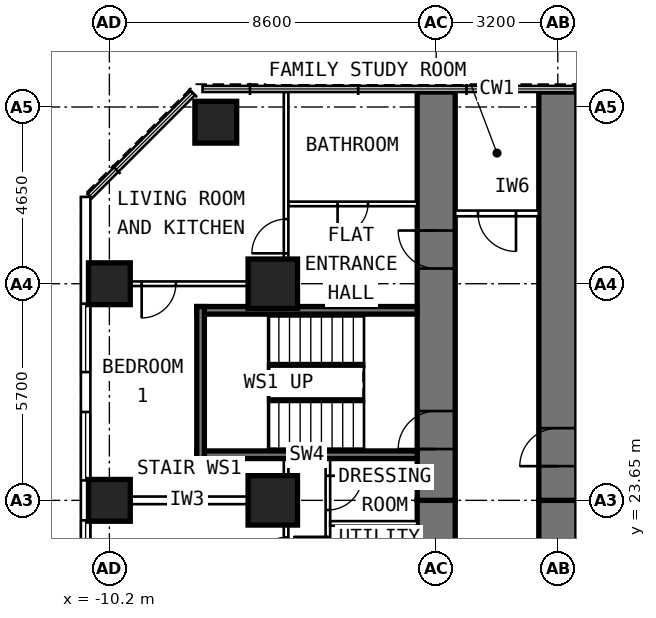
"""IFC4 building model, lengths in metres.
Left out: names, types, materials, properties, quantities, classifications, styles, units other than length and angle.
Written with IfcOpenShell. Run it as: python <this file> out.ifc"""

import sys

from ifc_helpers import new_model, si_unit, direction, frame, frame_2d, origin, origin_2d, place, context, subcontext, project, spatial, rectangle, extrude, element, fill, save


model = new_model("IFC4")
c1 = context("Model", 3, precision=1e-05, world=origin(), true_north=direction((0.0, 1.0)))
c2 = subcontext(c1, "Body", "Model", "MODEL_VIEW")
j1 = project(units=[si_unit("LENGTHUNIT", "METRE"), si_unit("PLANEANGLEUNIT", "RADIAN")], contexts=[c1])
p1 = place(None, origin())
s1 = spatial("IfcSite", under=j1, at=p1, CompositionType="ELEMENT")
p2 = place(p1, origin())
s2 = spatial("IfcBuilding", under=s1, at=p2, CompositionType="ELEMENT")
p3 = place(p2, frame((0.0, 0.0, 39.4)))
s3 = spatial("IfcBuildingStorey", under=s2, at=p3, CompositionType="ELEMENT", Elevation=39.4)
for number, where, z_axis, x_axis in (
    (1, (-10.2, 23.65, 0.0), (0.0, 0.0, 1.0), (0.0, 1.0, 0.0)),
    (2, (-10.2, 29.35, 0.0), (0.0, 0.0, 1.0), (0.0, 1.0, 0.0)),
    (3, (-7.4, 33.6, 0.0), (0.0, 0.0, 1.0), (0.0, 1.0, 0.0)),
):
    element("IfcColumn", number, at=place(p3, frame(where, z_axis=z_axis, x_axis=x_axis)), inside=s3, PredefinedType="COLUMN", context=c2, shape_type="SweptSolid", body=[
        extrude(rectangle(XDim=1.1, YDim=1.1, at=origin_2d()), origin(), (0.0, 0.0, 1.0), 3.6),
    ])
for number, where, z_axis, x_axis in (
    (4, (-5.9, 23.65, 0.0), (0.0, 0.0, 1.0), (0.0, 1.0, 0.0)),
    (5, (-5.9, 29.35, 0.0), (0.0, 0.0, 1.0), (0.0, 1.0, 0.0)),
):
    element("IfcColumn", number, at=place(p3, frame(where, z_axis=z_axis, x_axis=x_axis)), inside=s3, PredefinedType="COLUMN", context=c2, shape_type="SweptSolid", body=[
        extrude(rectangle(XDim=1.3, YDim=1.3, at=origin_2d()), origin(), (0.0, 0.0, 1.0), 3.6),
    ])
p4 = place(p3, frame((-1.6, 17.95, 0.0), z_axis=(0.0, 0.0, 1.0), x_axis=(0.0, 1.0, 0.0)))
e6 = element("IfcWall", 6, at=p4, inside=s3, PredefinedType="SHEAR", context=c2, shape_type="SweptSolid", body=[
    extrude(rectangle(XDim=5.7, YDim=1.0, at=frame_2d((2.85, 0.0))), origin(), (0.0, 0.0, 1.0), 3.6),
])
p5 = place(p3, frame((-1.6, 23.65, 0.0), z_axis=(0.0, 0.0, 1.0), x_axis=(0.0, 1.0, 0.0)))
e7 = element("IfcWall", 7, at=p5, inside=s3, PredefinedType="SHEAR", context=c2, shape_type="SweptSolid", body=[
    extrude(rectangle(XDim=10.745, YDim=1.0, at=frame_2d((5.373, 0.0))), origin(), (0.0, 0.0, 1.0), 3.6),
])
p6 = place(p5, frame((6.1, 0.0, 0.0)))
e8 = element("IfcOpeningElement", 8, at=p6, cuts=e7, PredefinedType="OPENING", context=c2, shape_type="SweptSolid", body=[
    extrude(rectangle(XDim=1.0, YDim=2.1, at=frame_2d((0.5, 1.05))), frame((0.0, 0.512, 0.0), z_axis=(0.0, -1.0, 0.0), x_axis=(1.0, 0.0, 0.0)), (0.0, 0.0, 1.0), 1.024),
])
p7 = place(p5, frame((1.35, 0.0, 0.0)))
e9 = element("IfcOpeningElement", 9, at=p7, cuts=e7, PredefinedType="OPENING", context=c2, shape_type="SweptSolid", body=[
    extrude(rectangle(XDim=1.0, YDim=2.1, at=frame_2d((0.5, 1.05))), frame((0.0, 0.512, 0.0), z_axis=(0.0, -1.0, 0.0), x_axis=(1.0, 0.0, 0.0)), (0.0, 0.0, 1.0), 1.024),
])
p8 = place(p3, frame((1.6, 17.95, 0.0), z_axis=(0.0, 0.0, 1.0), x_axis=(0.0, 1.0, 0.0)))
e10 = element("IfcWall", 10, at=p8, inside=s3, PredefinedType="SHEAR", context=c2, shape_type="SweptSolid", body=[
    extrude(rectangle(XDim=5.7, YDim=1.0, at=frame_2d((2.85, 0.0))), origin(), (0.0, 0.0, 1.0), 3.6),
])
p9 = place(p3, frame((1.6, 23.65, 0.0), z_axis=(0.0, 0.0, 1.0), x_axis=(0.0, 1.0, 0.0)))
e11 = element("IfcWall", 11, at=p9, inside=s3, PredefinedType="SHEAR", context=c2, shape_type="SweptSolid", body=[
    extrude(rectangle(XDim=10.745, YDim=1.0, at=frame_2d((5.373, 0.0))), origin(), (0.0, 0.0, 1.0), 3.6),
])
p10 = place(p9, frame((0.9, 0.0, 0.0)))
e12 = element("IfcOpeningElement", 12, at=p10, cuts=e11, PredefinedType="OPENING", context=c2, shape_type="SweptSolid", body=[
    extrude(rectangle(XDim=1.0, YDim=2.1, at=frame_2d((0.5, 1.05))), frame((0.0, 0.512, 0.0), z_axis=(0.0, -1.0, 0.0), x_axis=(1.0, 0.0, 0.0)), (0.0, 0.0, 1.0), 1.024),
])
p11 = place(p3, frame((-10.825, 6.409, 0.0), z_axis=(0.0, 0.0, 1.0), x_axis=(0.0, 1.0, 0.0)))
e13 = element("IfcWall", 13, at=p11, inside=s3, PredefinedType="SOLIDWALL", context=c2, shape_type="SweptSolid", body=[
    extrude(rectangle(XDim=25.226, YDim=0.25, at=frame_2d((12.613, 0.0))), origin(), (0.0, 0.0, 1.0), 3.35),
])
p12 = place(p11, frame((0.666, 0.0, 0.8)))
e14 = element("IfcOpeningElement", 14, at=p12, cuts=e13, PredefinedType="OPENING", context=c2, shape_type="SweptSolid", body=[
    extrude(rectangle(XDim=1.8, YDim=1.8, at=frame_2d((0.9, 0.9))), frame((0.0, 0.137, 0.0), z_axis=(0.0, -1.0, 0.0), x_axis=(1.0, 0.0, 0.0)), (0.0, 0.0, 1.0), 0.274),
])
p13 = place(p11, frame((3.516, 0.0, 0.8)))
e15 = element("IfcOpeningElement", 15, at=p13, cuts=e13, PredefinedType="OPENING", context=c2, shape_type="SweptSolid", body=[
    extrude(rectangle(XDim=1.8, YDim=1.8, at=frame_2d((0.9, 0.9))), frame((0.0, 0.137, 0.0), z_axis=(0.0, -1.0, 0.0), x_axis=(1.0, 0.0, 0.0)), (0.0, 0.0, 1.0), 0.274),
])
p14 = place(p11, frame((6.366, 0.0, 0.8)))
e16 = element("IfcOpeningElement", 16, at=p14, cuts=e13, PredefinedType="OPENING", context=c2, shape_type="SweptSolid", body=[
    extrude(rectangle(XDim=1.8, YDim=1.8, at=frame_2d((0.9, 0.9))), frame((0.0, 0.137, 0.0), z_axis=(0.0, -1.0, 0.0), x_axis=(1.0, 0.0, 0.0)), (0.0, 0.0, 1.0), 0.274),
])
p15 = place(p11, frame((9.216, 0.0, 0.8)))
e17 = element("IfcOpeningElement", 17, at=p15, cuts=e13, PredefinedType="OPENING", context=c2, shape_type="SweptSolid", body=[
    extrude(rectangle(XDim=1.8, YDim=1.8, at=frame_2d((0.9, 0.9))), frame((0.0, 0.137, 0.0), z_axis=(0.0, -1.0, 0.0), x_axis=(1.0, 0.0, 0.0)), (0.0, 0.0, 1.0), 0.274),
])
p16 = place(p11, frame((12.066, 0.0, 0.8)))
e18 = element("IfcOpeningElement", 18, at=p16, cuts=e13, PredefinedType="OPENING", context=c2, shape_type="SweptSolid", body=[
    extrude(rectangle(XDim=1.8, YDim=1.8, at=frame_2d((0.9, 0.9))), frame((0.0, 0.137, 0.0), z_axis=(0.0, -1.0, 0.0), x_axis=(1.0, 0.0, 0.0)), (0.0, 0.0, 1.0), 0.274),
])
p17 = place(p11, frame((14.916, 0.0, 0.8)))
e19 = element("IfcOpeningElement", 19, at=p17, cuts=e13, PredefinedType="OPENING", context=c2, shape_type="SweptSolid", body=[
    extrude(rectangle(XDim=1.8, YDim=1.8, at=frame_2d((0.9, 0.9))), frame((0.0, 0.137, 0.0), z_axis=(0.0, -1.0, 0.0), x_axis=(1.0, 0.0, 0.0)), (0.0, 0.0, 1.0), 0.274),
])
p18 = place(p11, frame((17.766, 0.0, 0.8)))
e20 = element("IfcOpeningElement", 20, at=p18, cuts=e13, PredefinedType="OPENING", context=c2, shape_type="SweptSolid", body=[
    extrude(rectangle(XDim=1.8, YDim=1.8, at=frame_2d((0.9, 0.9))), frame((0.0, 0.137, 0.0), z_axis=(0.0, -1.0, 0.0), x_axis=(1.0, 0.0, 0.0)), (0.0, 0.0, 1.0), 0.274),
])
p19 = place(p11, frame((20.616, 0.0, 0.8)))
e21 = element("IfcOpeningElement", 21, at=p19, cuts=e13, PredefinedType="OPENING", context=c2, shape_type="SweptSolid", body=[
    extrude(rectangle(XDim=1.8, YDim=1.8, at=frame_2d((0.9, 0.9))), frame((0.0, 0.137, 0.0), z_axis=(0.0, -1.0, 0.0), x_axis=(1.0, 0.0, 0.0)), (0.0, 0.0, 1.0), 0.274),
])
p20 = place(p3, frame((-4.45, 10.1, 0.0), z_axis=(0.0, 0.0, 1.0), x_axis=(0.0, 1.0, 0.0)))
e22 = element("IfcWall", 22, at=p20, inside=s3, PredefinedType="PARTITIONING", context=c2, shape_type="SweptSolid", body=[
    extrude(rectangle(XDim=14.65, YDim=0.12, at=frame_2d((7.325, 0.0))), origin(), (0.0, 0.0, 1.0), 3.35),
])
p21 = place(p20, frame((0.75, 0.0, 0.0)))
e23 = element("IfcOpeningElement", 23, at=p21, cuts=e22, PredefinedType="OPENING", context=c2, shape_type="SweptSolid", body=[
    extrude(rectangle(XDim=0.9, YDim=2.1, at=frame_2d((0.45, 1.05))), frame((0.0, 0.072, 0.0), z_axis=(0.0, -1.0, 0.0), x_axis=(1.0, 0.0, 0.0)), (0.0, 0.0, 1.0), 0.144),
])
p22 = place(p20, frame((3.305, 0.0, 0.0)))
e24 = element("IfcOpeningElement", 24, at=p22, cuts=e22, PredefinedType="OPENING", context=c2, shape_type="SweptSolid", body=[
    extrude(rectangle(XDim=0.8, YDim=2.1, at=frame_2d((0.4, 1.05))), frame((0.0, 0.072, 0.0), z_axis=(0.0, -1.0, 0.0), x_axis=(1.0, 0.0, 0.0)), (0.0, 0.0, 1.0), 0.144),
])
p23 = place(p20, frame((5.313, 0.0, 0.0)))
e25 = element("IfcOpeningElement", 25, at=p23, cuts=e22, PredefinedType="OPENING", context=c2, shape_type="SweptSolid", body=[
    extrude(rectangle(XDim=0.8, YDim=2.1, at=frame_2d((0.4, 1.05))), frame((0.0, 0.072, 0.0), z_axis=(0.0, -1.0, 0.0), x_axis=(1.0, 0.0, 0.0)), (0.0, 0.0, 1.0), 0.144),
])
p24 = place(p20, frame((6.87, 0.0, 0.0)))
e26 = element("IfcOpeningElement", 26, at=p24, cuts=e22, PredefinedType="OPENING", context=c2, shape_type="SweptSolid", body=[
    extrude(rectangle(XDim=0.9, YDim=2.1, at=frame_2d((0.45, 1.05))), frame((0.0, 0.072, 0.0), z_axis=(0.0, -1.0, 0.0), x_axis=(1.0, 0.0, 0.0)), (0.0, 0.0, 1.0), 0.144),
])
p25 = place(p20, frame((8.527, 0.0, 0.0)))
e27 = element("IfcOpeningElement", 27, at=p25, cuts=e22, PredefinedType="OPENING", context=c2, shape_type="SweptSolid", body=[
    extrude(rectangle(XDim=0.8, YDim=2.1, at=frame_2d((0.4, 1.05))), frame((0.0, 0.072, 0.0), z_axis=(0.0, -1.0, 0.0), x_axis=(1.0, 0.0, 0.0)), (0.0, 0.0, 1.0), 0.144),
])
p26 = place(p20, frame((10.133, 0.0, 0.0)))
e28 = element("IfcOpeningElement", 28, at=p26, cuts=e22, PredefinedType="OPENING", context=c2, shape_type="SweptSolid", body=[
    extrude(rectangle(XDim=0.8, YDim=2.1, at=frame_2d((0.4, 1.05))), frame((0.0, 0.072, 0.0), z_axis=(0.0, -1.0, 0.0), x_axis=(1.0, 0.0, 0.0)), (0.0, 0.0, 1.0), 0.144),
])
p27 = place(p20, frame((11.69, 0.0, 0.0)))
e29 = element("IfcOpeningElement", 29, at=p27, cuts=e22, PredefinedType="OPENING", context=c2, shape_type="SweptSolid", body=[
    extrude(rectangle(XDim=0.9, YDim=2.1, at=frame_2d((0.45, 1.05))), frame((0.0, 0.072, 0.0), z_axis=(0.0, -1.0, 0.0), x_axis=(1.0, 0.0, 0.0)), (0.0, 0.0, 1.0), 0.144),
])
p28 = place(p20, frame((13.297, 0.0, 0.0)))
e30 = element("IfcOpeningElement", 30, at=p28, cuts=e22, PredefinedType="OPENING", context=c2, shape_type="SweptSolid", body=[
    extrude(rectangle(XDim=0.9, YDim=2.1, at=frame_2d((0.45, 1.05))), frame((0.0, 0.072, 0.0), z_axis=(0.0, -1.0, 0.0), x_axis=(1.0, 0.0, 0.0)), (0.0, 0.0, 1.0), 0.144),
])
p29 = place(p3, frame((-5.55, 9.691, 0.0), z_axis=(0.0, 0.0, 1.0), x_axis=(0.0, 1.0, 0.0)))
e31 = element("IfcWall", 31, at=p29, inside=s3, PredefinedType="PARTITIONING", context=c2, shape_type="SweptSolid", body=[
    extrude(rectangle(XDim=15.059, YDim=0.12, at=frame_2d((7.53, 0.0))), origin(), (0.0, 0.0, 1.0), 3.35),
])
p30 = place(p29, frame((0.859, 0.0, 0.0)))
e32 = element("IfcOpeningElement", 32, at=p30, cuts=e31, PredefinedType="OPENING", context=c2, shape_type="SweptSolid", body=[
    extrude(rectangle(XDim=0.9, YDim=2.1, at=frame_2d((0.45, 1.05))), frame((0.0, 0.072, 0.0), z_axis=(0.0, -1.0, 0.0), x_axis=(1.0, 0.0, 0.0)), (0.0, 0.0, 1.0), 0.144),
])
p31 = place(p29, frame((3.534, 0.0, 0.0)))
e33 = element("IfcOpeningElement", 33, at=p31, cuts=e31, PredefinedType="OPENING", context=c2, shape_type="SweptSolid", body=[
    extrude(rectangle(XDim=0.9, YDim=2.1, at=frame_2d((0.45, 1.05))), frame((0.0, 0.072, 0.0), z_axis=(0.0, -1.0, 0.0), x_axis=(1.0, 0.0, 0.0)), (0.0, 0.0, 1.0), 0.144),
])
p32 = place(p29, frame((6.384, 0.0, 0.0)))
e34 = element("IfcOpeningElement", 34, at=p32, cuts=e31, PredefinedType="OPENING", context=c2, shape_type="SweptSolid", body=[
    extrude(rectangle(XDim=0.9, YDim=2.1, at=frame_2d((0.45, 1.05))), frame((0.0, 0.072, 0.0), z_axis=(0.0, -1.0, 0.0), x_axis=(1.0, 0.0, 0.0)), (0.0, 0.0, 1.0), 0.144),
])
p33 = place(p29, frame((9.234, 0.0, 0.0)))
e35 = element("IfcOpeningElement", 35, at=p33, cuts=e31, PredefinedType="OPENING", context=c2, shape_type="SweptSolid", body=[
    extrude(rectangle(XDim=0.9, YDim=2.1, at=frame_2d((0.45, 1.05))), frame((0.0, 0.072, 0.0), z_axis=(0.0, -1.0, 0.0), x_axis=(1.0, 0.0, 0.0)), (0.0, 0.0, 1.0), 0.144),
])
p34 = place(p29, frame((12.084, 0.0, 0.0)))
e36 = element("IfcOpeningElement", 36, at=p34, cuts=e31, PredefinedType="OPENING", context=c2, shape_type="SweptSolid", body=[
    extrude(rectangle(XDim=0.9, YDim=2.1, at=frame_2d((0.45, 1.05))), frame((0.0, 0.072, 0.0), z_axis=(0.0, -1.0, 0.0), x_axis=(1.0, 0.0, 0.0)), (0.0, 0.0, 1.0), 0.144),
])
p35 = place(p3, frame((-2.1, 23.043, 0.0), z_axis=(0.0, 0.0, 1.0), x_axis=(-1.0, 0.0, 0.0)))
e37 = element("IfcWall", 37, at=p35, inside=s3, PredefinedType="PARTITIONING", context=c2, shape_type="SweptSolid", body=[
    extrude(rectangle(XDim=2.29, YDim=0.12, at=frame_2d((1.145, 0.0))), origin(), (0.0, 0.0, 1.0), 3.35),
])
p36 = place(p3, frame((-5.61, 23.65, 0.0), z_axis=(0.0, 0.0, 1.0), x_axis=(-1.0, 0.0, 0.0)))
e38 = element("IfcWall", 38, at=p36, inside=s3, PredefinedType="PARTITIONING", context=c2, shape_type="SweptSolid", body=[
    extrude(rectangle(XDim=5.09, YDim=0.2, at=frame_2d((2.545, 0.0))), origin(), (0.0, 0.0, 1.0), 2.45),
])
p37 = place(p3, frame((-5.61, 29.35, 0.0), z_axis=(0.0, 0.0, 1.0), x_axis=(-1.0, 0.0, 0.0)))
e39 = element("IfcWall", 39, at=p37, inside=s3, PredefinedType="PARTITIONING", context=c2, shape_type="SweptSolid", body=[
    extrude(rectangle(XDim=5.09, YDim=0.12, at=frame_2d((2.545, 0.0))), origin(), (0.0, 0.0, 1.0), 2.45),
])
p38 = place(p37, frame((2.84, 0.0, 0.0)))
e40 = element("IfcOpeningElement", 40, at=p38, cuts=e39, PredefinedType="OPENING", context=c2, shape_type="SweptSolid", body=[
    extrude(rectangle(XDim=0.9, YDim=2.1, at=frame_2d((0.45, 1.05))), frame((0.0, 0.072, 0.0), z_axis=(0.0, -1.0, 0.0), x_axis=(1.0, 0.0, 0.0)), (0.0, 0.0, 1.0), 0.144),
])
p39 = place(p3, frame((-5.55, 28.95, 0.0), z_axis=(0.0, 0.0, 1.0), x_axis=(0.0, 1.0, 0.0)))
e41 = element("IfcWall", 41, at=p39, inside=s3, PredefinedType="PARTITIONING", context=c2, shape_type="SweptSolid", body=[
    extrude(rectangle(XDim=5.445, YDim=0.12, at=frame_2d((2.723, 0.0))), origin(), (0.0, 0.0, 1.0), 3.35),
])
p40 = place(p39, frame((1.2, 0.0, 0.0)))
e42 = element("IfcOpeningElement", 42, at=p40, cuts=e41, PredefinedType="OPENING", context=c2, shape_type="SweptSolid", body=[
    extrude(rectangle(XDim=0.9, YDim=2.1, at=frame_2d((0.45, 1.05))), frame((0.0, 0.072, 0.0), z_axis=(0.0, -1.0, 0.0), x_axis=(1.0, 0.0, 0.0)), (0.0, 0.0, 1.0), 0.144),
])
p41 = place(p3, frame((-2.1, 31.45, 0.0), z_axis=(0.0, 0.0, 1.0), x_axis=(-1.0, 0.0, 0.0)))
e43 = element("IfcWall", 43, at=p41, inside=s3, PredefinedType="PARTITIONING", context=c2, shape_type="SweptSolid", body=[
    extrude(rectangle(XDim=3.39, YDim=0.12, at=frame_2d((1.695, 0.0))), origin(), (0.0, 0.0, 1.0), 3.35),
])
p42 = place(p41, frame((1.295, 0.0, 0.0)))
e44 = element("IfcOpeningElement", 44, at=p42, cuts=e43, PredefinedType="OPENING", context=c2, shape_type="SweptSolid", body=[
    extrude(rectangle(XDim=0.8, YDim=2.1, at=frame_2d((0.4, 1.05))), frame((0.0, 0.072, 0.0), z_axis=(0.0, -1.0, 0.0), x_axis=(1.0, 0.0, 0.0)), (0.0, 0.0, 1.0), 0.144),
])
p43 = place(p3, frame((1.1, 31.2, 0.0), z_axis=(0.0, 0.0, 1.0), x_axis=(-1.0, 0.0, 0.0)))
e45 = element("IfcWall", 45, at=p43, inside=s3, PredefinedType="PARTITIONING", context=c2, shape_type="SweptSolid", body=[
    extrude(rectangle(XDim=2.2, YDim=0.15, at=frame_2d((1.1, 0.0))), origin(), (0.0, 0.0, 1.0), 3.35),
])
p44 = place(p43, frame((0.6, 0.0, 0.0)))
e46 = element("IfcOpeningElement", 46, at=p44, cuts=e45, PredefinedType="OPENING", context=c2, shape_type="SweptSolid", body=[
    extrude(rectangle(XDim=1.0, YDim=2.1, at=frame_2d((0.5, 1.05))), frame((0.0, 0.087, 0.0), z_axis=(0.0, -1.0, 0.0), x_axis=(1.0, 0.0, 0.0)), (0.0, 0.0, 1.0), 0.174),
])
for number, where, z_axis, x_axis in (
    (47, (-2.1, 24.85, 0.0), (0.0, 0.0, 1.0), (-1.0, 0.0, 0.0)),
    (48, (-2.1, 28.65, 0.0), (0.0, 0.0, 1.0), (-1.0, 0.0, 0.0)),
):
    element("IfcWall", number, at=place(p3, frame(where, z_axis=z_axis, x_axis=x_axis)), inside=s3, PredefinedType="SHEAR", context=c2, shape_type="SweptSolid", body=[
        extrude(rectangle(XDim=5.8, YDim=0.2, at=frame_2d((2.9, 0.0))), origin(), (0.0, 0.0, 1.0), 3.33),
    ])
p45 = place(p3, frame((-7.8, 24.75, 0.0), z_axis=(0.0, 0.0, 1.0), x_axis=(0.0, 1.0, 0.0)))
e49 = element("IfcWall", 49, at=p45, inside=s3, PredefinedType="SHEAR", context=c2, shape_type="SweptSolid", body=[
    extrude(rectangle(XDim=4.0, YDim=0.2, at=frame_2d((2.0, 0.0))), origin(), (0.0, 0.0, 1.0), 3.33),
])
p46 = place(p17, origin())
e50 = element("IfcWindow", 50, at=p46, inside=s3, PartitioningType="SINGLE_PANEL", PredefinedType="WINDOW", context=c2, shape_type="SweptSolid", body=[
    extrude(rectangle(XDim=1.8, YDim=1.8, at=frame_2d((0.9, 0.9))), frame((0.0, 0.03, 0.0), z_axis=(0.0, -1.0, 0.0), x_axis=(1.0, 0.0, 0.0)), (0.0, 0.0, 1.0), 0.06),
])
fill(e19, e50)
p47 = place(p18, origin())
e51 = element("IfcWindow", 51, at=p47, inside=s3, PartitioningType="SINGLE_PANEL", PredefinedType="WINDOW", context=c2, shape_type="SweptSolid", body=[
    extrude(rectangle(XDim=1.8, YDim=1.8, at=frame_2d((0.9, 0.9))), frame((0.0, 0.03, 0.0), z_axis=(0.0, -1.0, 0.0), x_axis=(1.0, 0.0, 0.0)), (0.0, 0.0, 1.0), 0.06),
])
fill(e20, e51)
p48 = place(p19, origin())
e52 = element("IfcWindow", 52, at=p48, inside=s3, PartitioningType="SINGLE_PANEL", PredefinedType="WINDOW", context=c2, shape_type="SweptSolid", body=[
    extrude(rectangle(XDim=1.8, YDim=1.8, at=frame_2d((0.9, 0.9))), frame((0.0, 0.03, 0.0), z_axis=(0.0, -1.0, 0.0), x_axis=(1.0, 0.0, 0.0)), (0.0, 0.0, 1.0), 0.06),
])
fill(e21, e52)
p49 = place(p34, origin())
e53 = element("IfcDoor", 53, at=p49, inside=s3, OperationType="SINGLE_SWING_LEFT", PredefinedType="DOOR", context=c2, shape_type="SweptSolid", body=[
    extrude(rectangle(XDim=0.9, YDim=2.1, at=frame_2d((0.45, 1.05))), frame((0.0, 0.025, 0.0), z_axis=(0.0, -1.0, 0.0), x_axis=(1.0, 0.0, 0.0)), (0.0, 0.0, 1.0), 0.05),
])
fill(e36, e53)
p50 = place(p27, origin())
e54 = element("IfcDoor", 54, at=p50, inside=s3, OperationType="SINGLE_SWING_RIGHT", PredefinedType="DOOR", context=c2, shape_type="SweptSolid", body=[
    extrude(rectangle(XDim=0.9, YDim=2.1, at=frame_2d((0.45, 1.05))), frame((0.0, 0.025, 0.0), z_axis=(0.0, -1.0, 0.0), x_axis=(1.0, 0.0, 0.0)), (0.0, 0.0, 1.0), 0.05),
])
fill(e29, e54)
p51 = place(p28, frame((0.9, 0.0, 0.0), z_axis=(0.0, 0.0, 1.0), x_axis=(-1.0, 0.0, 0.0)))
e55 = element("IfcDoor", 55, at=p51, inside=s3, OperationType="SINGLE_SWING_LEFT", PredefinedType="DOOR", context=c2, shape_type="SweptSolid", body=[
    extrude(rectangle(XDim=0.9, YDim=2.1, at=frame_2d((0.45, 1.05))), frame((0.0, 0.025, 0.0), z_axis=(0.0, -1.0, 0.0), x_axis=(1.0, 0.0, 0.0)), (0.0, 0.0, 1.0), 0.05),
])
fill(e30, e55)
p52 = place(p38, origin())
e56 = element("IfcDoor", 56, at=p52, inside=s3, OperationType="SINGLE_SWING_RIGHT", PredefinedType="DOOR", context=c2, shape_type="SweptSolid", body=[
    extrude(rectangle(XDim=0.9, YDim=2.1, at=frame_2d((0.45, 1.05))), frame((0.0, 0.025, 0.0), z_axis=(0.0, -1.0, 0.0), x_axis=(1.0, 0.0, 0.0)), (0.0, 0.0, 1.0), 0.05),
])
fill(e40, e56)
p53 = place(p40, origin())
e57 = element("IfcDoor", 57, at=p53, inside=s3, OperationType="SINGLE_SWING_LEFT", PredefinedType="DOOR", context=c2, shape_type="SweptSolid", body=[
    extrude(rectangle(XDim=0.9, YDim=2.1, at=frame_2d((0.45, 1.05))), frame((0.0, 0.025, 0.0), z_axis=(0.0, -1.0, 0.0), x_axis=(1.0, 0.0, 0.0)), (0.0, 0.0, 1.0), 0.05),
])
fill(e42, e57)
p54 = place(p42, origin())
e58 = element("IfcDoor", 58, at=p54, inside=s3, OperationType="SINGLE_SWING_RIGHT", PredefinedType="DOOR", context=c2, shape_type="SweptSolid", body=[
    extrude(rectangle(XDim=0.8, YDim=2.1, at=frame_2d((0.4, 1.05))), frame((0.0, 0.025, 0.0), z_axis=(0.0, -1.0, 0.0), x_axis=(1.0, 0.0, 0.0)), (0.0, 0.0, 1.0), 0.05),
])
fill(e44, e58)
p55 = place(p6, origin())
e59 = element("IfcDoor", 59, at=p55, inside=s3, OperationType="SINGLE_SWING_RIGHT", PredefinedType="DOOR", context=c2, shape_type="SweptSolid", body=[
    extrude(rectangle(XDim=1.0, YDim=2.1, at=frame_2d((0.5, 1.05))), frame((0.0, 0.25, 0.0), z_axis=(0.0, -1.0, 0.0), x_axis=(1.0, 0.0, 0.0)), (0.0, 0.0, 1.0), 0.5),
])
fill(e8, e59)
p56 = place(p10, origin())
e60 = element("IfcDoor", 60, at=p56, inside=s3, OperationType="SINGLE_SWING_LEFT", PredefinedType="DOOR", context=c2, shape_type="SweptSolid", body=[
    extrude(rectangle(XDim=1.0, YDim=2.1, at=frame_2d((0.5, 1.05))), frame((0.0, 0.25, 0.0), z_axis=(0.0, -1.0, 0.0), x_axis=(1.0, 0.0, 0.0)), (0.0, 0.0, 1.0), 0.5),
])
fill(e12, e60)
p57 = place(p44, origin())
e61 = element("IfcDoor", 61, at=p57, inside=s3, OperationType="SINGLE_SWING_LEFT", PredefinedType="DOOR", context=c2, shape_type="SweptSolid", body=[
    extrude(rectangle(XDim=1.0, YDim=2.1, at=frame_2d((0.5, 1.05))), frame((0.0, 0.025, 0.0), z_axis=(0.0, -1.0, 0.0), x_axis=(1.0, 0.0, 0.0)), (0.0, 0.0, 1.0), 0.05),
])
fill(e46, e61)
p58 = place(p7, origin())
e62 = element("IfcDoor", 62, at=p58, inside=s3, OperationType="SINGLE_SWING_LEFT", PredefinedType="DOOR", context=c2, shape_type="SweptSolid", body=[
    extrude(rectangle(XDim=1.0, YDim=2.1, at=frame_2d((0.5, 1.05))), frame((0.0, 0.25, 0.0), z_axis=(0.0, -1.0, 0.0), x_axis=(1.0, 0.0, 0.0)), (0.0, 0.0, 1.0), 0.5),
])
fill(e9, e62)
save(model, sys.argv[1])
